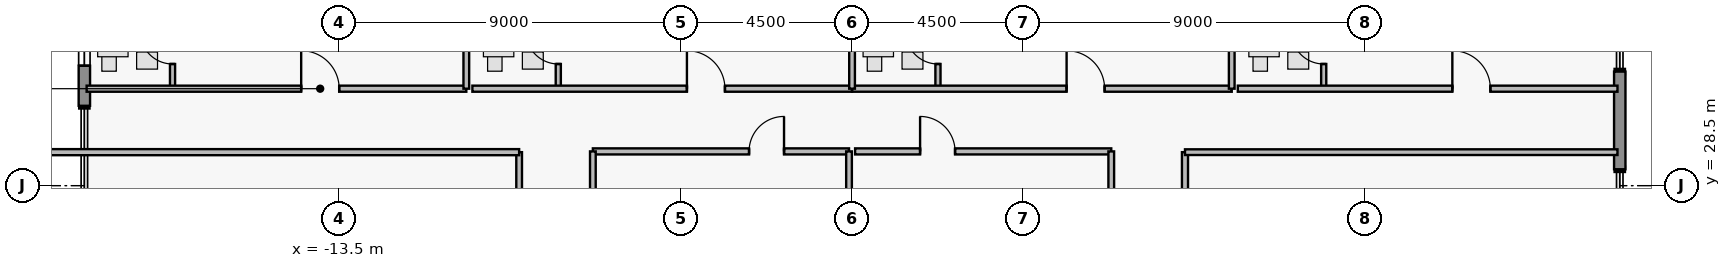
"""IFC4 building model, lengths in metres.
Left out: names, types, materials, properties, quantities, classifications, styles, units other than length and angle.
Written with IfcOpenShell. Run it as: python <this file> out.ifc"""

import sys

from ifc_helpers import new_model, si_unit, direction, frame, frame_2d, origin, place, context, subcontext, project, spatial, rectangle, extrude, element, fill, save


model = new_model("IFC4")
c1 = context("Model", 3, precision=1e-05, world=origin(), true_north=direction((0.0, 1.0)))
c2 = subcontext(c1, "Body", "Model", "MODEL_VIEW")
j1 = project(units=[si_unit("LENGTHUNIT", "METRE"), si_unit("PLANEANGLEUNIT", "RADIAN")], contexts=[c1])
p1 = place(None, origin())
s1 = spatial("IfcSite", under=j1, at=p1, CompositionType="ELEMENT")
p2 = place(p1, origin())
s2 = spatial("IfcBuilding", under=s1, at=p2, CompositionType="ELEMENT")
p3 = place(p2, frame((0.0, 0.0, 254.45)))
s3 = spatial("IfcBuildingStorey", under=s2, at=p3, CompositionType="ELEMENT", Elevation=254.45)
p4 = place(p3, frame((-20.2, 30.6, 0.0), z_axis=(0.0, 0.0, 1.0), x_axis=(0.0, 1.0, 0.0)))
e1 = element("IfcWall", 1, at=p4, inside=s3, PredefinedType="STANDARD", context=c2, shape_type="SweptSolid", body=[
    extrude(rectangle(XDim=5.0, YDim=0.3, at=frame_2d((2.5, 0.0))), origin(), (0.0, 0.0, 1.0), 3.48),
])
p5 = place(p4, frame((1.055, 0.0, 0.95)))
e2 = element("IfcOpeningElement", 2, at=p5, cuts=e1, PredefinedType="OPENING", context=c2, shape_type="SweptSolid", body=[
    extrude(rectangle(XDim=1.15, YDim=1.55, at=frame_2d((0.575, 0.775))), frame((0.0, 0.16, 0.0), z_axis=(0.0, -1.0, 0.0), x_axis=(1.0, 0.0, 0.0)), (0.0, 0.0, 1.0), 0.32),
])
p6 = place(p4, frame((3.27, 0.0, 0.95)))
e3 = element("IfcOpeningElement", 3, at=p6, cuts=e1, PredefinedType="OPENING", context=c2, shape_type="SweptSolid", body=[
    extrude(rectangle(XDim=1.15, YDim=1.55, at=frame_2d((0.575, 0.775))), frame((0.0, 0.16, 0.0), z_axis=(0.0, -1.0, 0.0), x_axis=(1.0, 0.0, 0.0)), (0.0, 0.0, 1.0), 0.32),
])
p7 = place(p3, frame((20.2, 31.5, 0.0), z_axis=(0.0, 0.0, 1.0), x_axis=(0.0, -1.0, 0.0)))
e4 = element("IfcWall", 4, at=p7, inside=s3, PredefinedType="STANDARD", context=c2, shape_type="SweptSolid", body=[
    extrude(rectangle(XDim=2.57, YDim=0.3, at=frame_2d((1.285, 0.0))), origin(), (0.0, 0.0, 1.0), 3.48),
])
p8 = place(p3, frame((-17.88, 31.05, 0.0), z_axis=(0.0, 0.0, 1.0), x_axis=(0.0, 1.0, 0.0)))
e5 = element("IfcWall", 5, at=p8, inside=s3, PredefinedType="PLUMBINGWALL", context=c2, shape_type="SweptSolid", body=[
    extrude(rectangle(XDim=2.36, YDim=0.135, at=frame_2d((1.18, 0.0))), origin(), (0.0, 0.0, 1.0), 3.48),
])
p9 = place(p8, frame((0.65, 0.0, 0.0)))
e6 = element("IfcOpeningElement", 6, at=p9, cuts=e5, PredefinedType="OPENING", context=c2, shape_type="SweptSolid", body=[
    extrude(rectangle(XDim=0.85, YDim=2.1, at=frame_2d((0.425, 1.05))), frame((0.0, 0.077, 0.0), z_axis=(0.0, -1.0, 0.0), x_axis=(1.0, 0.0, 0.0)), (0.0, 0.0, 1.0), 0.155),
])
p10 = place(p3, frame((-20.14, 31.05, 0.0), z_axis=(0.0, 0.0, 1.0), x_axis=(1.0, 0.0, 0.0)))
e7 = element("IfcWall", 7, at=p10, inside=s3, PredefinedType="PARTITIONING", context=c2, shape_type="SweptSolid", body=[
    extrude(rectangle(XDim=9.99, YDim=0.16, at=frame_2d((4.995, 0.0))), origin(), (0.0, 0.0, 1.0), 3.48),
])
p11 = place(p10, frame((5.645, 0.0, 0.0)))
e8 = element("IfcOpeningElement", 8, at=p11, cuts=e7, PredefinedType="OPENING", context=c2, shape_type="SweptSolid", body=[
    extrude(rectangle(XDim=1.0, YDim=2.15, at=frame_2d((0.5, 1.075))), frame((0.0, 0.09, 0.0), z_axis=(0.0, -1.0, 0.0), x_axis=(1.0, 0.0, 0.0)), (0.0, 0.0, 1.0), 0.18),
])
p12 = place(p3, frame((-7.73, 31.05, 0.0), z_axis=(0.0, 0.0, 1.0), x_axis=(0.0, 1.0, 0.0)))
e9 = element("IfcWall", 9, at=p12, inside=s3, PredefinedType="PLUMBINGWALL", context=c2, shape_type="SweptSolid", body=[
    extrude(rectangle(XDim=2.36, YDim=0.135, at=frame_2d((1.18, 0.0))), origin(), (0.0, 0.0, 1.0), 3.48),
])
p13 = place(p12, frame((0.65, 0.0, 0.0)))
e10 = element("IfcOpeningElement", 10, at=p13, cuts=e9, PredefinedType="OPENING", context=c2, shape_type="SweptSolid", body=[
    extrude(rectangle(XDim=0.85, YDim=2.1, at=frame_2d((0.425, 1.05))), frame((0.0, 0.077, 0.0), z_axis=(0.0, -1.0, 0.0), x_axis=(1.0, 0.0, 0.0)), (0.0, 0.0, 1.0), 0.155),
])
p14 = place(p3, frame((-9.99, 31.05, 0.0), z_axis=(0.0, 0.0, 1.0), x_axis=(1.0, 0.0, 0.0)))
e11 = element("IfcWall", 11, at=p14, inside=s3, PredefinedType="PARTITIONING", context=c2, shape_type="SweptSolid", body=[
    extrude(rectangle(XDim=9.99, YDim=0.16, at=frame_2d((4.995, 0.0))), origin(), (0.0, 0.0, 1.0), 3.48),
])
p15 = place(p14, frame((5.645, 0.0, 0.0)))
e12 = element("IfcOpeningElement", 12, at=p15, cuts=e11, PredefinedType="OPENING", context=c2, shape_type="SweptSolid", body=[
    extrude(rectangle(XDim=1.0, YDim=2.15, at=frame_2d((0.5, 1.075))), frame((0.0, 0.09, 0.0), z_axis=(0.0, -1.0, 0.0), x_axis=(1.0, 0.0, 0.0)), (0.0, 0.0, 1.0), 0.18),
])
p16 = place(p3, frame((2.26, 31.05, 0.0), z_axis=(0.0, 0.0, 1.0), x_axis=(0.0, 1.0, 0.0)))
e13 = element("IfcWall", 13, at=p16, inside=s3, PredefinedType="PLUMBINGWALL", context=c2, shape_type="SweptSolid", body=[
    extrude(rectangle(XDim=2.36, YDim=0.135, at=frame_2d((1.18, 0.0))), origin(), (0.0, 0.0, 1.0), 3.48),
])
p17 = place(p16, frame((0.65, 0.0, 0.0)))
e14 = element("IfcOpeningElement", 14, at=p17, cuts=e13, PredefinedType="OPENING", context=c2, shape_type="SweptSolid", body=[
    extrude(rectangle(XDim=0.85, YDim=2.1, at=frame_2d((0.425, 1.05))), frame((0.0, 0.077, 0.0), z_axis=(0.0, -1.0, 0.0), x_axis=(1.0, 0.0, 0.0)), (0.0, 0.0, 1.0), 0.155),
])
p18 = place(p3, frame((0.0, 31.05, 0.0), z_axis=(0.0, 0.0, 1.0), x_axis=(1.0, 0.0, 0.0)))
e15 = element("IfcWall", 15, at=p18, inside=s3, PredefinedType="PARTITIONING", context=c2, shape_type="SweptSolid", body=[
    extrude(rectangle(XDim=9.99, YDim=0.16, at=frame_2d((4.995, 0.0))), origin(), (0.0, 0.0, 1.0), 3.48),
])
p19 = place(p18, frame((5.645, 0.0, 0.0)))
e16 = element("IfcOpeningElement", 16, at=p19, cuts=e15, PredefinedType="OPENING", context=c2, shape_type="SweptSolid", body=[
    extrude(rectangle(XDim=1.0, YDim=2.15, at=frame_2d((0.5, 1.075))), frame((0.0, 0.09, 0.0), z_axis=(0.0, -1.0, 0.0), x_axis=(1.0, 0.0, 0.0)), (0.0, 0.0, 1.0), 0.18),
])
p20 = place(p3, frame((12.41, 31.05, 0.0), z_axis=(0.0, 0.0, 1.0), x_axis=(0.0, 1.0, 0.0)))
e17 = element("IfcWall", 17, at=p20, inside=s3, PredefinedType="PLUMBINGWALL", context=c2, shape_type="SweptSolid", body=[
    extrude(rectangle(XDim=2.36, YDim=0.135, at=frame_2d((1.18, 0.0))), origin(), (0.0, 0.0, 1.0), 3.48),
])
p21 = place(p20, frame((0.65, 0.0, 0.0)))
e18 = element("IfcOpeningElement", 18, at=p21, cuts=e17, PredefinedType="OPENING", context=c2, shape_type="SweptSolid", body=[
    extrude(rectangle(XDim=0.85, YDim=2.1, at=frame_2d((0.425, 1.05))), frame((0.0, 0.077, 0.0), z_axis=(0.0, -1.0, 0.0), x_axis=(1.0, 0.0, 0.0)), (0.0, 0.0, 1.0), 0.155),
])
p22 = place(p3, frame((10.15, 31.05, 0.0), z_axis=(0.0, 0.0, 1.0), x_axis=(1.0, 0.0, 0.0)))
e19 = element("IfcWall", 19, at=p22, inside=s3, PredefinedType="PARTITIONING", context=c2, shape_type="SweptSolid", body=[
    extrude(rectangle(XDim=9.99, YDim=0.16, at=frame_2d((4.995, 0.0))), origin(), (0.0, 0.0, 1.0), 3.48),
])
p23 = place(p22, frame((5.645, 0.0, 0.0)))
e20 = element("IfcOpeningElement", 20, at=p23, cuts=e19, PredefinedType="OPENING", context=c2, shape_type="SweptSolid", body=[
    extrude(rectangle(XDim=1.0, YDim=2.15, at=frame_2d((0.5, 1.075))), frame((0.0, 0.09, 0.0), z_axis=(0.0, -1.0, 0.0), x_axis=(1.0, 0.0, 0.0)), (0.0, 0.0, 1.0), 0.18),
])
p24 = place(p3, frame((-6.82, 29.4, 0.0), z_axis=(0.0, 0.0, 1.0), x_axis=(1.0, 0.0, 0.0)))
e21 = element("IfcWall", 21, at=p24, inside=s3, PredefinedType="PARTITIONING", context=c2, shape_type="SweptSolid", body=[
    extrude(rectangle(XDim=6.74, YDim=0.16, at=frame_2d((3.37, 0.0))), origin(), (0.0, 0.0, 1.0), 3.48),
])
p25 = place(p24, frame((4.11, 0.0, 0.0)))
e22 = element("IfcOpeningElement", 22, at=p25, cuts=e21, PredefinedType="OPENING", context=c2, shape_type="SweptSolid", body=[
    extrude(rectangle(XDim=0.92, YDim=2.12, at=frame_2d((0.46, 1.06))), frame((0.0, 0.09, 0.0), z_axis=(0.0, -1.0, 0.0), x_axis=(1.0, 0.0, 0.0)), (0.0, 0.0, 1.0), 0.18),
])
p26 = place(p3, frame((0.08, 29.4, 0.0), z_axis=(0.0, 0.0, 1.0), x_axis=(1.0, 0.0, 0.0)))
e23 = element("IfcWall", 23, at=p26, inside=s3, PredefinedType="PARTITIONING", context=c2, shape_type="SweptSolid", body=[
    extrude(rectangle(XDim=6.74, YDim=0.16, at=frame_2d((3.37, 0.0))), origin(), (0.0, 0.0, 1.0), 3.48),
])
p27 = place(p26, frame((1.71, 0.0, 0.0)))
e24 = element("IfcOpeningElement", 24, at=p27, cuts=e23, PredefinedType="OPENING", context=c2, shape_type="SweptSolid", body=[
    extrude(rectangle(XDim=0.92, YDim=2.12, at=frame_2d((0.46, 1.06))), frame((0.0, 0.09, 0.0), z_axis=(0.0, -1.0, 0.0), x_axis=(1.0, 0.0, 0.0)), (0.0, 0.0, 1.0), 0.18),
])
p28 = place(p3, frame((8.76, 23.81, 0.0), z_axis=(0.0, 0.0, 1.0), x_axis=(0.0, 1.0, 0.0)))
e25 = element("IfcWall", 25, at=p28, inside=s3, PredefinedType="PARTITIONING", context=c2, shape_type="SweptSolid", body=[
    extrude(rectangle(XDim=5.57, YDim=0.16, at=frame_2d((2.785, 0.0))), origin(), (0.0, 0.0, 1.0), 3.48),
])
p29 = place(p28, frame((2.245, 0.0, 0.0)))
e26 = element("IfcOpeningElement", 26, at=p29, cuts=e25, PredefinedType="OPENING", context=c2, shape_type="SweptSolid", body=[
    extrude(rectangle(XDim=1.08, YDim=2.18, at=frame_2d((0.54, 1.09))), frame((0.0, 0.09, 0.0), z_axis=(0.0, -1.0, 0.0), x_axis=(1.0, 0.0, 0.0)), (0.0, 0.0, 1.0), 0.18),
])
for number, where, z_axis, x_axis in (
    (27, (-10.15, 31.05, 0.0), (0.0, 0.0, 1.0), (0.0, 1.0, 0.0)),
    (28, (0.0, 31.05, 0.0), (0.0, 0.0, 1.0), (0.0, 1.0, 0.0)),
    (29, (9.99, 31.05, 0.0), (0.0, 0.0, 1.0), (0.0, 1.0, 0.0)),
):
    element("IfcWall", number, at=place(p3, frame(where, z_axis=z_axis, x_axis=x_axis)), inside=s3, PredefinedType="PARTITIONING", context=c2, shape_type="SweptSolid", body=[
        extrude(rectangle(XDim=7.87, YDim=0.15, at=frame_2d((3.935, 0.0))), origin(), (0.0, 0.0, 1.0), 3.48),
    ])
for number, where, z_axis, x_axis in (
    (30, (-6.82, 27.0, 0.0), (0.0, 0.0, 1.0), (0.0, 1.0, 0.0)),
    (31, (-0.08, 27.0, 0.0), (0.0, 0.0, 1.0), (0.0, 1.0, 0.0)),
    (32, (6.82, 27.0, 0.0), (0.0, 0.0, 1.0), (0.0, 1.0, 0.0)),
):
    element("IfcWall", number, at=place(p3, frame(where, z_axis=z_axis, x_axis=x_axis)), inside=s3, PredefinedType="PARTITIONING", context=c2, shape_type="SweptSolid", body=[
        extrude(rectangle(XDim=2.4, YDim=0.15, at=frame_2d((1.2, 0.0))), origin(), (0.0, 0.0, 1.0), 3.48),
    ])
p30 = place(p3, frame((-8.76, 16.7, 0.0), z_axis=(0.0, 0.0, 1.0), x_axis=(0.0, 1.0, 0.0)))
e33 = element("IfcWall", 33, at=p30, inside=s3, PredefinedType="PARTITIONING", context=c2, shape_type="SweptSolid", body=[
    extrude(rectangle(XDim=12.68, YDim=0.15, at=frame_2d((6.34, 0.0))), origin(), (0.0, 0.0, 1.0), 3.48),
])
p31 = place(p3, frame((-22.64, 29.38, 0.0), z_axis=(0.0, 0.0, 1.0), x_axis=(1.0, 0.0, 0.0)))
e34 = element("IfcWall", 34, at=p31, inside=s3, PredefinedType="PARTITIONING", context=c2, shape_type="SweptSolid", body=[
    extrude(rectangle(XDim=13.88, YDim=0.16, at=frame_2d((6.94, 0.0))), origin(), (0.0, 0.0, 1.0), 3.48),
])
p32 = place(p3, frame((8.76, 29.38, 0.0), z_axis=(0.0, 0.0, 1.0), x_axis=(1.0, 0.0, 0.0)))
e35 = element("IfcWall", 35, at=p32, inside=s3, PredefinedType="PARTITIONING", context=c2, shape_type="SweptSolid", body=[
    extrude(rectangle(XDim=11.38, YDim=0.15, at=frame_2d((5.69, 0.0))), origin(), (0.0, 0.0, 1.0), 3.48),
])
p33 = place(p5, origin())
e36 = element("IfcWindow", 36, at=p33, inside=s3, PartitioningType="SINGLE_PANEL", PredefinedType="WINDOW", context=c2, shape_type="SweptSolid", body=[
    extrude(rectangle(XDim=1.15, YDim=1.55, at=frame_2d((0.575, 0.775))), frame((0.0, 0.03, 0.0), z_axis=(0.0, -1.0, 0.0), x_axis=(1.0, 0.0, 0.0)), (0.0, 0.0, 1.0), 0.06),
])
fill(e2, e36)
p34 = place(p9, origin())
e37 = element("IfcDoor", 37, at=p34, inside=s3, OperationType="SINGLE_SWING_RIGHT", PredefinedType="DOOR", context=c2, shape_type="SweptSolid", body=[
    extrude(rectangle(XDim=0.85, YDim=2.1, at=frame_2d((0.425, 1.05))), frame((0.0, 0.025, 0.0), z_axis=(0.0, -1.0, 0.0), x_axis=(1.0, 0.0, 0.0)), (0.0, 0.0, 1.0), 0.05),
])
fill(e6, e37)
p35 = place(p11, origin())
e38 = element("IfcDoor", 38, at=p35, inside=s3, OperationType="SINGLE_SWING_LEFT", PredefinedType="DOOR", context=c2, shape_type="SweptSolid", body=[
    extrude(rectangle(XDim=1.0, YDim=2.15, at=frame_2d((0.5, 1.075))), frame((0.0, 0.025, 0.0), z_axis=(0.0, -1.0, 0.0), x_axis=(1.0, 0.0, 0.0)), (0.0, 0.0, 1.0), 0.05),
])
fill(e8, e38)
p36 = place(p13, origin())
e39 = element("IfcDoor", 39, at=p36, inside=s3, OperationType="SINGLE_SWING_RIGHT", PredefinedType="DOOR", context=c2, shape_type="SweptSolid", body=[
    extrude(rectangle(XDim=0.85, YDim=2.1, at=frame_2d((0.425, 1.05))), frame((0.0, 0.025, 0.0), z_axis=(0.0, -1.0, 0.0), x_axis=(1.0, 0.0, 0.0)), (0.0, 0.0, 1.0), 0.05),
])
fill(e10, e39)
p37 = place(p15, origin())
e40 = element("IfcDoor", 40, at=p37, inside=s3, OperationType="SINGLE_SWING_LEFT", PredefinedType="DOOR", context=c2, shape_type="SweptSolid", body=[
    extrude(rectangle(XDim=1.0, YDim=2.15, at=frame_2d((0.5, 1.075))), frame((0.0, 0.025, 0.0), z_axis=(0.0, -1.0, 0.0), x_axis=(1.0, 0.0, 0.0)), (0.0, 0.0, 1.0), 0.05),
])
fill(e12, e40)
p38 = place(p17, origin())
e41 = element("IfcDoor", 41, at=p38, inside=s3, OperationType="SINGLE_SWING_RIGHT", PredefinedType="DOOR", context=c2, shape_type="SweptSolid", body=[
    extrude(rectangle(XDim=0.85, YDim=2.1, at=frame_2d((0.425, 1.05))), frame((0.0, 0.025, 0.0), z_axis=(0.0, -1.0, 0.0), x_axis=(1.0, 0.0, 0.0)), (0.0, 0.0, 1.0), 0.05),
])
fill(e14, e41)
p39 = place(p19, origin())
e42 = element("IfcDoor", 42, at=p39, inside=s3, OperationType="SINGLE_SWING_LEFT", PredefinedType="DOOR", context=c2, shape_type="SweptSolid", body=[
    extrude(rectangle(XDim=1.0, YDim=2.15, at=frame_2d((0.5, 1.075))), frame((0.0, 0.025, 0.0), z_axis=(0.0, -1.0, 0.0), x_axis=(1.0, 0.0, 0.0)), (0.0, 0.0, 1.0), 0.05),
])
fill(e16, e42)
p40 = place(p21, origin())
e43 = element("IfcDoor", 43, at=p40, inside=s3, OperationType="SINGLE_SWING_RIGHT", PredefinedType="DOOR", context=c2, shape_type="SweptSolid", body=[
    extrude(rectangle(XDim=0.85, YDim=2.1, at=frame_2d((0.425, 1.05))), frame((0.0, 0.025, 0.0), z_axis=(0.0, -1.0, 0.0), x_axis=(1.0, 0.0, 0.0)), (0.0, 0.0, 1.0), 0.05),
])
fill(e18, e43)
p41 = place(p23, origin())
e44 = element("IfcDoor", 44, at=p41, inside=s3, OperationType="SINGLE_SWING_LEFT", PredefinedType="DOOR", context=c2, shape_type="SweptSolid", body=[
    extrude(rectangle(XDim=1.0, YDim=2.15, at=frame_2d((0.5, 1.075))), frame((0.0, 0.025, 0.0), z_axis=(0.0, -1.0, 0.0), x_axis=(1.0, 0.0, 0.0)), (0.0, 0.0, 1.0), 0.05),
])
fill(e20, e44)
p42 = place(p25, origin())
e45 = element("IfcDoor", 45, at=p42, inside=s3, OperationType="SINGLE_SWING_RIGHT", PredefinedType="DOOR", context=c2, shape_type="SweptSolid", body=[
    extrude(rectangle(XDim=0.92, YDim=2.12, at=frame_2d((0.46, 1.06))), frame((0.0, 0.025, 0.0), z_axis=(0.0, -1.0, 0.0), x_axis=(1.0, 0.0, 0.0)), (0.0, 0.0, 1.0), 0.05),
])
fill(e22, e45)
p43 = place(p27, origin())
e46 = element("IfcDoor", 46, at=p43, inside=s3, OperationType="SINGLE_SWING_LEFT", PredefinedType="DOOR", context=c2, shape_type="SweptSolid", body=[
    extrude(rectangle(XDim=0.92, YDim=2.12, at=frame_2d((0.46, 1.06))), frame((0.0, 0.025, 0.0), z_axis=(0.0, -1.0, 0.0), x_axis=(1.0, 0.0, 0.0)), (0.0, 0.0, 1.0), 0.05),
])
fill(e24, e46)
save(model, sys.argv[1])
